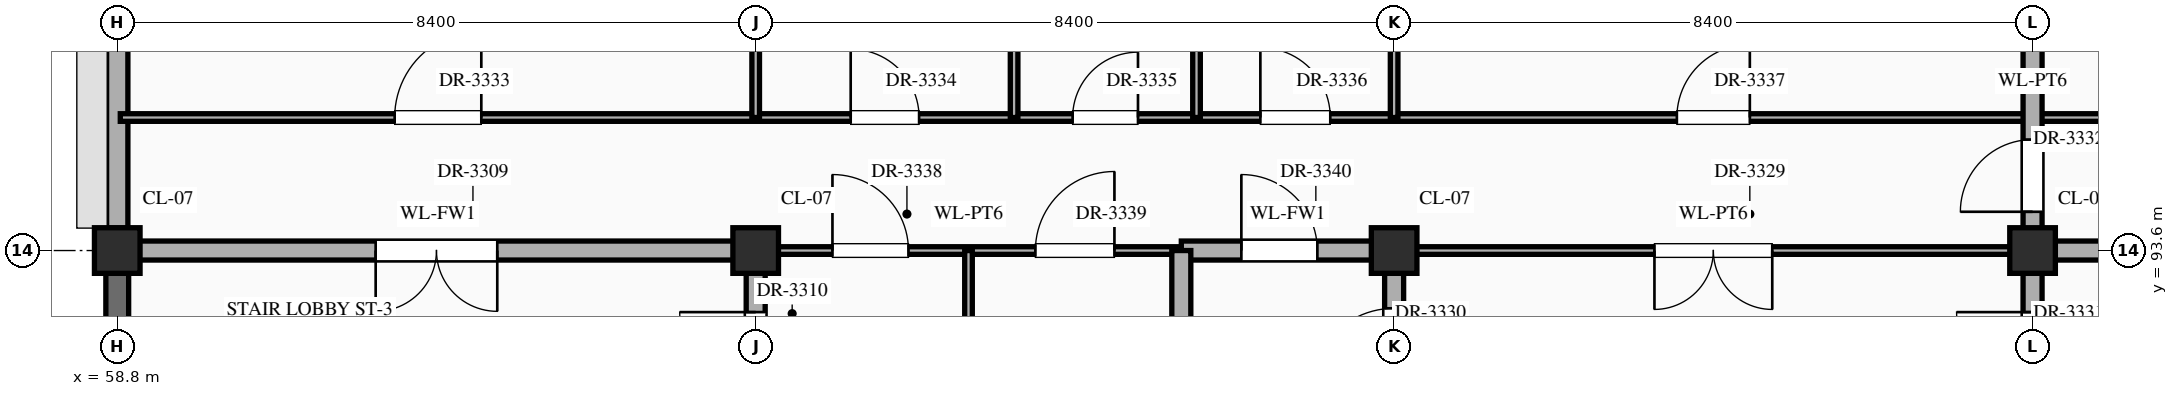
"""IFC4 building model, lengths in metres.
Left out: names, types, materials, properties, quantities, classifications, styles, units other than length and angle.
Written with IfcOpenShell. Run it as: python <this file> out.ifc"""

import sys

from ifc_helpers import new_model, si_unit, direction, frame, frame_2d, origin, origin_2d, place, context, subcontext, project, spatial, rectangle, extrude, element, fill, save


model = new_model("IFC4")
c1 = context("Model", 3, precision=1e-05, world=origin(), true_north=direction((0.0, 1.0)))
c2 = subcontext(c1, "Body", "Model", "MODEL_VIEW")
j1 = project(units=[si_unit("LENGTHUNIT", "METRE"), si_unit("PLANEANGLEUNIT", "RADIAN")], contexts=[c1])
p1 = place(None, origin())
s1 = spatial("IfcSite", under=j1, at=p1, CompositionType="ELEMENT")
p2 = place(p1, origin())
s2 = spatial("IfcBuilding", under=s1, at=p2, CompositionType="ELEMENT")
p3 = place(p2, frame((0.0, 0.0, 64.5)))
s3 = spatial("IfcBuildingStorey", under=s2, at=p3, CompositionType="ELEMENT", Elevation=64.5)
for number, where, z_axis, x_axis in (
    (1, (58.8, 93.6, 0.0), (0.0, 0.0, 1.0), (1.0, 0.0, 0.0)),
    (2, (67.2, 93.6, 0.0), (0.0, 0.0, 1.0), (1.0, 0.0, 0.0)),
    (3, (75.6, 93.6, 0.0), (0.0, 0.0, 1.0), (1.0, 0.0, 0.0)),
    (4, (84.0, 93.6, 0.0), (0.0, 0.0, 1.0), (1.0, 0.0, 0.0)),
):
    element("IfcColumn", number, at=place(p3, frame(where, z_axis=z_axis, x_axis=x_axis)), inside=s3, PredefinedType="COLUMN", context=c2, shape_type="SweptSolid", body=[
        extrude(rectangle(XDim=0.6, YDim=0.6, at=origin_2d()), origin(), (0.0, 0.0, 1.0), 4.2),
    ])
p4 = place(p3, frame((58.8, 86.695, 0.0), z_axis=(0.0, 0.0, 1.0), x_axis=(0.0, 1.0, 0.0)))
e5 = element("IfcWall", 5, at=p4, inside=s3, PredefinedType="SHEAR", context=c2, shape_type="SweptSolid", body=[
    extrude(rectangle(XDim=6.61, YDim=0.3, at=frame_2d((3.305, 0.0))), origin(), (0.0, 0.0, 1.0), 3.95),
])
p5 = place(p3, frame((58.8, 93.895, 0.0), z_axis=(0.0, 0.0, 1.0), x_axis=(0.0, 1.0, 0.0)))
e6 = element("IfcWall", 6, at=p5, inside=s3, PredefinedType="STANDARD", context=c2, shape_type="SweptSolid", body=[
    extrude(rectangle(XDim=6.61, YDim=0.28, at=frame_2d((3.305, 0.0))), origin(), (0.0, 0.0, 1.0), 3.3),
])
p6 = place(p5, frame((4.08, 0.0, 0.85)))
e7 = element("IfcOpeningElement", 7, at=p6, cuts=e6, PredefinedType="OPENING", context=c2, shape_type="SweptSolid", body=[
    extrude(rectangle(XDim=1.05, YDim=1.74, at=frame_2d((0.525, 0.87))), frame((0.0, 0.152, 0.0), z_axis=(0.0, -1.0, 0.0), x_axis=(1.0, 0.0, 0.0)), (0.0, 0.0, 1.0), 0.304),
])
p7 = place(p3, frame((58.84, 93.6, 0.0), z_axis=(0.0, 0.0, 1.0), x_axis=(1.0, 0.0, 0.0)))
e8 = element("IfcWall", 8, at=p7, inside=s3, PredefinedType="STANDARD", context=c2, shape_type="SweptSolid", body=[
    extrude(rectangle(XDim=8.36, YDim=0.25, at=frame_2d((4.18, 0.0))), origin(), (0.0, 0.0, 1.0), 3.1),
])
p8 = place(p7, frame((3.36, 0.0, 0.0)))
e9 = element("IfcOpeningElement", 9, at=p8, cuts=e8, PredefinedType="OPENING", context=c2, shape_type="SweptSolid", body=[
    extrude(rectangle(XDim=1.6, YDim=2.3, at=frame_2d((0.8, 1.15))), frame((0.0, 0.137, 0.0), z_axis=(0.0, -1.0, 0.0), x_axis=(1.0, 0.0, 0.0)), (0.0, 0.0, 1.0), 0.274),
])
p9 = place(p3, frame((67.2, 93.6, 0.0), z_axis=(0.0, 0.0, 1.0), x_axis=(1.0, 0.0, 0.0)))
e10 = element("IfcWall", 10, at=p9, inside=s3, PredefinedType="STANDARD", context=c2, shape_type="SweptSolid", body=[
    extrude(rectangle(XDim=5.6, YDim=0.1, at=frame_2d((2.8, 0.0))), origin(), (0.0, 0.0, 1.0), 3.1),
])
p10 = place(p9, frame((1.01, 0.0, 0.0)))
e11 = element("IfcOpeningElement", 11, at=p10, cuts=e10, PredefinedType="OPENING", context=c2, shape_type="SweptSolid", body=[
    extrude(rectangle(XDim=1.0, YDim=2.25, at=frame_2d((0.5, 1.125))), frame((0.0, 0.062, 0.0), z_axis=(0.0, -1.0, 0.0), x_axis=(1.0, 0.0, 0.0)), (0.0, 0.0, 1.0), 0.124),
])
p11 = place(p9, frame((3.68, 0.0, 0.0)))
e12 = element("IfcOpeningElement", 12, at=p11, cuts=e10, PredefinedType="OPENING", context=c2, shape_type="SweptSolid", body=[
    extrude(rectangle(XDim=1.04, YDim=2.2, at=frame_2d((0.52, 1.1))), frame((0.0, 0.062, 0.0), z_axis=(0.0, -1.0, 0.0), x_axis=(1.0, 0.0, 0.0)), (0.0, 0.0, 1.0), 0.124),
])
p12 = place(p3, frame((72.8, 93.6, 0.0), z_axis=(0.0, 0.0, 1.0), x_axis=(1.0, 0.0, 0.0)))
e13 = element("IfcWall", 13, at=p12, inside=s3, PredefinedType="STANDARD", context=c2, shape_type="SweptSolid", body=[
    extrude(rectangle(XDim=2.8, YDim=0.25, at=frame_2d((1.4, 0.0))), origin(), (0.0, 0.0, 1.0), 3.1),
])
p13 = place(p12, frame((0.79, 0.0, 0.0)))
e14 = element("IfcOpeningElement", 14, at=p13, cuts=e13, PredefinedType="OPENING", context=c2, shape_type="SweptSolid", body=[
    extrude(rectangle(XDim=1.0, YDim=2.2, at=frame_2d((0.5, 1.1))), frame((0.0, 0.137, 0.0), z_axis=(0.0, -1.0, 0.0), x_axis=(1.0, 0.0, 0.0)), (0.0, 0.0, 1.0), 0.274),
])
p14 = place(p3, frame((75.6, 93.6, 0.0), z_axis=(0.0, 0.0, 1.0), x_axis=(1.0, 0.0, 0.0)))
e15 = element("IfcWall", 15, at=p14, inside=s3, PredefinedType="STANDARD", context=c2, shape_type="SweptSolid", body=[
    extrude(rectangle(XDim=8.4, YDim=0.1, at=frame_2d((4.2, 0.0))), origin(), (0.0, 0.0, 1.0), 3.1),
])
p15 = place(p14, frame((3.425, 0.0, 0.0)))
e16 = element("IfcOpeningElement", 16, at=p15, cuts=e15, PredefinedType="OPENING", context=c2, shape_type="SweptSolid", body=[
    extrude(rectangle(XDim=1.55, YDim=2.35, at=frame_2d((0.775, 1.175))), frame((0.0, 0.062, 0.0), z_axis=(0.0, -1.0, 0.0), x_axis=(1.0, 0.0, 0.0)), (0.0, 0.0, 1.0), 0.124),
])
p16 = place(p3, frame((84.0, 93.6, 0.0), z_axis=(0.0, 0.0, 1.0), x_axis=(1.0, 0.0, 0.0)))
e17 = element("IfcWall", 17, at=p16, inside=s3, PredefinedType="STANDARD", context=c2, shape_type="SweptSolid", body=[
    extrude(rectangle(XDim=8.4, YDim=0.25, at=frame_2d((4.2, 0.0))), origin(), (0.0, 0.0, 1.0), 3.1),
])
p17 = place(p16, frame((3.7, 0.0, 0.0)))
e18 = element("IfcOpeningElement", 18, at=p17, cuts=e17, PredefinedType="OPENING", context=c2, shape_type="SweptSolid", body=[
    extrude(rectangle(XDim=1.0, YDim=2.2, at=frame_2d((0.5, 1.1))), frame((0.0, 0.137, 0.0), z_axis=(0.0, -1.0, 0.0), x_axis=(1.0, 0.0, 0.0)), (0.0, 0.0, 1.0), 0.274),
])
p18 = place(p3, frame((58.84, 95.35, 0.0), z_axis=(0.0, 0.0, 1.0), x_axis=(1.0, 0.0, 0.0)))
e19 = element("IfcWall", 19, at=p18, inside=s3, PredefinedType="STANDARD", context=c2, shape_type="SweptSolid", body=[
    extrude(rectangle(XDim=50.32, YDim=0.1, at=frame_2d((25.16, 0.0))), origin(), (0.0, 0.0, 1.0), 3.95),
])
p19 = place(p18, frame((3.61, 0.0, 0.0)))
e20 = element("IfcOpeningElement", 20, at=p19, cuts=e19, PredefinedType="OPENING", context=c2, shape_type="SweptSolid", body=[
    extrude(rectangle(XDim=1.14, YDim=2.4, at=frame_2d((0.57, 1.2))), frame((0.0, 0.062, 0.0), z_axis=(0.0, -1.0, 0.0), x_axis=(1.0, 0.0, 0.0)), (0.0, 0.0, 1.0), 0.124),
])
p20 = place(p18, frame((9.61, 0.0, 0.0)))
e21 = element("IfcOpeningElement", 21, at=p20, cuts=e19, PredefinedType="OPENING", context=c2, shape_type="SweptSolid", body=[
    extrude(rectangle(XDim=0.9, YDim=2.15, at=frame_2d((0.45, 1.075))), frame((0.0, 0.062, 0.0), z_axis=(0.0, -1.0, 0.0), x_axis=(1.0, 0.0, 0.0)), (0.0, 0.0, 1.0), 0.124),
])
p21 = place(p18, frame((12.53, 0.0, 0.0)))
e22 = element("IfcOpeningElement", 22, at=p21, cuts=e19, PredefinedType="OPENING", context=c2, shape_type="SweptSolid", body=[
    extrude(rectangle(XDim=0.86, YDim=2.1, at=frame_2d((0.43, 1.05))), frame((0.0, 0.062, 0.0), z_axis=(0.0, -1.0, 0.0), x_axis=(1.0, 0.0, 0.0)), (0.0, 0.0, 1.0), 0.124),
])
p22 = place(p18, frame((15.0, 0.0, 0.0)))
e23 = element("IfcOpeningElement", 23, at=p22, cuts=e19, PredefinedType="OPENING", context=c2, shape_type="SweptSolid", body=[
    extrude(rectangle(XDim=0.92, YDim=2.15, at=frame_2d((0.46, 1.075))), frame((0.0, 0.062, 0.0), z_axis=(0.0, -1.0, 0.0), x_axis=(1.0, 0.0, 0.0)), (0.0, 0.0, 1.0), 0.124),
])
p23 = place(p18, frame((20.48, 0.0, 0.0)))
e24 = element("IfcOpeningElement", 24, at=p23, cuts=e19, PredefinedType="OPENING", context=c2, shape_type="SweptSolid", body=[
    extrude(rectangle(XDim=0.96, YDim=2.2, at=frame_2d((0.48, 1.1))), frame((0.0, 0.062, 0.0), z_axis=(0.0, -1.0, 0.0), x_axis=(1.0, 0.0, 0.0)), (0.0, 0.0, 1.0), 0.124),
])
p24 = place(p18, frame((28.8, 0.0, 0.0)))
e25 = element("IfcOpeningElement", 25, at=p24, cuts=e19, PredefinedType="OPENING", context=c2, shape_type="SweptSolid", body=[
    extrude(rectangle(XDim=1.12, YDim=2.25, at=frame_2d((0.56, 1.125))), frame((0.0, 0.062, 0.0), z_axis=(0.0, -1.0, 0.0), x_axis=(1.0, 0.0, 0.0)), (0.0, 0.0, 1.0), 0.124),
])
p25 = place(p18, frame((34.68, 0.0, 0.0)))
e26 = element("IfcOpeningElement", 26, at=p25, cuts=e19, PredefinedType="OPENING", context=c2, shape_type="SweptSolid", body=[
    extrude(rectangle(XDim=1.16, YDim=2.3, at=frame_2d((0.58, 1.15))), frame((0.0, 0.062, 0.0), z_axis=(0.0, -1.0, 0.0), x_axis=(1.0, 0.0, 0.0)), (0.0, 0.0, 1.0), 0.124),
])
p26 = place(p18, frame((37.56, 0.0, 0.0)))
e27 = element("IfcOpeningElement", 27, at=p26, cuts=e19, PredefinedType="OPENING", context=c2, shape_type="SweptSolid", body=[
    extrude(rectangle(XDim=1.2, YDim=2.35, at=frame_2d((0.6, 1.175))), frame((0.0, 0.062, 0.0), z_axis=(0.0, -1.0, 0.0), x_axis=(1.0, 0.0, 0.0)), (0.0, 0.0, 1.0), 0.124),
])
p27 = place(p18, frame((40.04, 0.0, 0.0)))
e28 = element("IfcOpeningElement", 28, at=p27, cuts=e19, PredefinedType="OPENING", context=c2, shape_type="SweptSolid", body=[
    extrude(rectangle(XDim=1.24, YDim=2.3, at=frame_2d((0.62, 1.15))), frame((0.0, 0.062, 0.0), z_axis=(0.0, -1.0, 0.0), x_axis=(1.0, 0.0, 0.0)), (0.0, 0.0, 1.0), 0.124),
])
p28 = place(p18, frame((45.5, 0.0, 0.0)))
e29 = element("IfcOpeningElement", 29, at=p28, cuts=e19, PredefinedType="OPENING", context=c2, shape_type="SweptSolid", body=[
    extrude(rectangle(XDim=1.28, YDim=2.35, at=frame_2d((0.64, 1.175))), frame((0.0, 0.062, 0.0), z_axis=(0.0, -1.0, 0.0), x_axis=(1.0, 0.0, 0.0)), (0.0, 0.0, 1.0), 0.124),
])
p29 = place(p3, frame((67.2, 91.2, 0.0), z_axis=(0.0, 0.0, 1.0), x_axis=(0.0, 1.0, 0.0)))
e30 = element("IfcWall", 30, at=p29, inside=s3, PredefinedType="STANDARD", context=c2, shape_type="SweptSolid", body=[
    extrude(rectangle(XDim=2.4, YDim=0.25, at=frame_2d((1.2, 0.0))), origin(), (0.0, 0.0, 1.0), 3.2),
])
p30 = place(p29, frame((0.59, 0.0, 0.0)))
e31 = element("IfcOpeningElement", 31, at=p30, cuts=e30, PredefinedType="OPENING", context=c2, shape_type="SweptSolid", body=[
    extrude(rectangle(XDim=1.0, YDim=2.2, at=frame_2d((0.5, 1.1))), frame((0.0, 0.137, 0.0), z_axis=(0.0, -1.0, 0.0), x_axis=(1.0, 0.0, 0.0)), (0.0, 0.0, 1.0), 0.274),
])
p31 = place(p3, frame((67.2, 95.35, 0.0), z_axis=(0.0, 0.0, 1.0), x_axis=(0.0, 1.0, 0.0)))
e32 = element("IfcWall", 32, at=p31, inside=s3, PredefinedType="STANDARD", context=c2, shape_type="SweptSolid", body=[
    extrude(rectangle(XDim=5.45, YDim=0.1, at=frame_2d((2.725, 0.0))), origin(), (0.0, 0.0, 1.0), 3.2),
])
p32 = place(p3, frame((70.0, 86.4, 0.0), z_axis=(0.0, 0.0, 1.0), x_axis=(0.0, 1.0, 0.0)))
e33 = element("IfcWall", 33, at=p32, inside=s3, PredefinedType="STANDARD", context=c2, shape_type="SweptSolid", body=[
    extrude(rectangle(XDim=7.2, YDim=0.1, at=frame_2d((3.6, 0.0))), origin(), (0.0, 0.0, 1.0), 3.95),
])
p33 = place(p32, frame((3.12, 0.0, 0.0)))
e34 = element("IfcOpeningElement", 34, at=p33, cuts=e33, PredefinedType="OPENING", context=c2, shape_type="SweptSolid", body=[
    extrude(rectangle(XDim=0.96, YDim=2.2, at=frame_2d((0.48, 1.1))), frame((0.0, 0.062, 0.0), z_axis=(0.0, -1.0, 0.0), x_axis=(1.0, 0.0, 0.0)), (0.0, 0.0, 1.0), 0.124),
])
p34 = place(p3, frame((70.6, 95.35, 0.0), z_axis=(0.0, 0.0, 1.0), x_axis=(0.0, 1.0, 0.0)))
e35 = element("IfcWall", 35, at=p34, inside=s3, PredefinedType="STANDARD", context=c2, shape_type="SweptSolid", body=[
    extrude(rectangle(XDim=5.45, YDim=0.1, at=frame_2d((2.725, 0.0))), origin(), (0.0, 0.0, 1.0), 3.95),
])
p35 = place(p34, frame((2.155, 0.0, 0.0)))
e36 = element("IfcOpeningElement", 36, at=p35, cuts=e35, PredefinedType="OPENING", context=c2, shape_type="SweptSolid", body=[
    extrude(rectangle(XDim=1.14, YDim=2.4, at=frame_2d((0.57, 1.2))), frame((0.0, 0.062, 0.0), z_axis=(0.0, -1.0, 0.0), x_axis=(1.0, 0.0, 0.0)), (0.0, 0.0, 1.0), 0.124),
])
p36 = place(p3, frame((72.8, 86.4, 0.0), z_axis=(0.0, 0.0, 1.0), x_axis=(0.0, 1.0, 0.0)))
e37 = element("IfcWall", 37, at=p36, inside=s3, PredefinedType="STANDARD", context=c2, shape_type="SweptSolid", body=[
    extrude(rectangle(XDim=7.2, YDim=0.25, at=frame_2d((3.6, 0.0))), origin(), (0.0, 0.0, 1.0), 3.95),
])
p37 = place(p36, frame((3.125, 0.0, 0.0)))
e38 = element("IfcOpeningElement", 38, at=p37, cuts=e37, PredefinedType="OPENING", context=c2, shape_type="SweptSolid", body=[
    extrude(rectangle(XDim=0.95, YDim=2.15, at=frame_2d((0.475, 1.075))), frame((0.0, 0.137, 0.0), z_axis=(0.0, -1.0, 0.0), x_axis=(1.0, 0.0, 0.0)), (0.0, 0.0, 1.0), 0.274),
])
p38 = place(p3, frame((73.0, 95.35, 0.0), z_axis=(0.0, 0.0, 1.0), x_axis=(0.0, 1.0, 0.0)))
e39 = element("IfcWall", 39, at=p38, inside=s3, PredefinedType="STANDARD", context=c2, shape_type="SweptSolid", body=[
    extrude(rectangle(XDim=5.45, YDim=0.1, at=frame_2d((2.725, 0.0))), origin(), (0.0, 0.0, 1.0), 3.95),
])
p39 = place(p38, frame((2.275, 0.0, 0.0)))
e40 = element("IfcOpeningElement", 40, at=p39, cuts=e39, PredefinedType="OPENING", context=c2, shape_type="SweptSolid", body=[
    extrude(rectangle(XDim=0.9, YDim=2.15, at=frame_2d((0.45, 1.075))), frame((0.0, 0.062, 0.0), z_axis=(0.0, -1.0, 0.0), x_axis=(1.0, 0.0, 0.0)), (0.0, 0.0, 1.0), 0.124),
])
p40 = place(p3, frame((75.6, 86.4, 0.0), z_axis=(0.0, 0.0, 1.0), x_axis=(0.0, 1.0, 0.0)))
e41 = element("IfcWall", 41, at=p40, inside=s3, PredefinedType="STANDARD", context=c2, shape_type="SweptSolid", body=[
    extrude(rectangle(XDim=7.2, YDim=0.25, at=frame_2d((3.6, 0.0))), origin(), (0.0, 0.0, 1.0), 3.2),
])
p41 = place(p40, frame((5.34, 0.0, 0.0)))
e42 = element("IfcOpeningElement", 42, at=p41, cuts=e41, PredefinedType="OPENING", context=c2, shape_type="SweptSolid", body=[
    extrude(rectangle(XDim=1.1, YDim=2.2, at=frame_2d((0.55, 1.1))), frame((0.0, 0.137, 0.0), z_axis=(0.0, -1.0, 0.0), x_axis=(1.0, 0.0, 0.0)), (0.0, 0.0, 1.0), 0.274),
])
p42 = place(p3, frame((75.6, 95.35, 0.0), z_axis=(0.0, 0.0, 1.0), x_axis=(0.0, 1.0, 0.0)))
e43 = element("IfcWall", 43, at=p42, inside=s3, PredefinedType="STANDARD", context=c2, shape_type="SweptSolid", body=[
    extrude(rectangle(XDim=5.45, YDim=0.1, at=frame_2d((2.725, 0.0))), origin(), (0.0, 0.0, 1.0), 3.2),
])
p43 = place(p3, frame((84.0, 79.24, 0.0), z_axis=(0.0, 0.0, 1.0), x_axis=(0.0, 1.0, 0.0)))
e44 = element("IfcWall", 44, at=p43, inside=s3, PredefinedType="STANDARD", context=c2, shape_type="SweptSolid", body=[
    extrude(rectangle(XDim=25.16, YDim=0.25, at=frame_2d((12.58, 0.0))), origin(), (0.0, 0.0, 1.0), 3.1),
])
p44 = place(p43, frame((22.72, 0.0, 0.0)))
e45 = element("IfcOpeningElement", 45, at=p44, cuts=e44, PredefinedType="OPENING", context=c2, shape_type="SweptSolid", body=[
    extrude(rectangle(XDim=1.5, YDim=2.25, at=frame_2d((0.75, 1.125))), frame((0.0, 0.137, 0.0), z_axis=(0.0, -1.0, 0.0), x_axis=(1.0, 0.0, 0.0)), (0.0, 0.0, 1.0), 0.274),
])
p45 = place(p43, frame((12.55, 0.0, 0.0)))
e46 = element("IfcOpeningElement", 46, at=p45, cuts=e44, PredefinedType="OPENING", context=c2, shape_type="SweptSolid", body=[
    extrude(rectangle(XDim=1.0, YDim=2.2, at=frame_2d((0.5, 1.1))), frame((0.0, 0.137, 0.0), z_axis=(0.0, -1.0, 0.0), x_axis=(1.0, 0.0, 0.0)), (0.0, 0.0, 1.0), 0.274),
])
p46 = place(p43, frame((14.87, 0.0, 0.0)))
e47 = element("IfcOpeningElement", 47, at=p46, cuts=e44, PredefinedType="OPENING", context=c2, shape_type="SweptSolid", body=[
    extrude(rectangle(XDim=0.95, YDim=2.15, at=frame_2d((0.475, 1.075))), frame((0.0, 0.137, 0.0), z_axis=(0.0, -1.0, 0.0), x_axis=(1.0, 0.0, 0.0)), (0.0, 0.0, 1.0), 0.274),
])
p47 = place(p43, frame((5.7, 0.0, 0.0)))
e48 = element("IfcOpeningElement", 48, at=p47, cuts=e44, PredefinedType="OPENING", context=c2, shape_type="SweptSolid", body=[
    extrude(rectangle(XDim=0.95, YDim=2.15, at=frame_2d((0.475, 1.075))), frame((0.0, 0.137, 0.0), z_axis=(0.0, -1.0, 0.0), x_axis=(1.0, 0.0, 0.0)), (0.0, 0.0, 1.0), 0.274),
])
p48 = place(p8, frame((1.6, 0.0, 0.0), z_axis=(0.0, 0.0, 1.0), x_axis=(-1.0, 0.0, 0.0)))
e49 = element("IfcDoor", 49, at=p48, inside=s3, OperationType="DOUBLE_DOOR_SINGLE_SWING", PredefinedType="DOOR", context=c2, shape_type="SweptSolid", body=[
    extrude(rectangle(XDim=1.6, YDim=2.3, at=frame_2d((0.8, 1.15))), frame((0.0, 0.025, 0.0), z_axis=(0.0, -1.0, 0.0), x_axis=(1.0, 0.0, 0.0)), (0.0, 0.0, 1.0), 0.05),
])
fill(e9, e49)
p49 = place(p30, origin())
e50 = element("IfcDoor", 50, at=p49, inside=s3, OperationType="SINGLE_SWING_RIGHT", PredefinedType="DOOR", context=c2, shape_type="SweptSolid", body=[
    extrude(rectangle(XDim=1.0, YDim=2.2, at=frame_2d((0.5, 1.1))), frame((0.0, 0.025, 0.0), z_axis=(0.0, -1.0, 0.0), x_axis=(1.0, 0.0, 0.0)), (0.0, 0.0, 1.0), 0.05),
])
fill(e31, e50)
p50 = place(p15, frame((1.55, 0.0, 0.0), z_axis=(0.0, 0.0, 1.0), x_axis=(-1.0, 0.0, 0.0)))
e51 = element("IfcDoor", 51, at=p50, inside=s3, OperationType="DOUBLE_DOOR_SINGLE_SWING", PredefinedType="DOOR", context=c2, shape_type="SweptSolid", body=[
    extrude(rectangle(XDim=1.55, YDim=2.35, at=frame_2d((0.775, 1.175))), frame((0.0, 0.025, 0.0), z_axis=(0.0, -1.0, 0.0), x_axis=(1.0, 0.0, 0.0)), (0.0, 0.0, 1.0), 0.05),
])
fill(e16, e51)
p51 = place(p41, origin())
e52 = element("IfcDoor", 52, at=p51, inside=s3, OperationType="SINGLE_SWING_LEFT", PredefinedType="DOOR", context=c2, shape_type="SweptSolid", body=[
    extrude(rectangle(XDim=1.1, YDim=2.2, at=frame_2d((0.55, 1.1))), frame((0.0, 0.025, 0.0), z_axis=(0.0, -1.0, 0.0), x_axis=(1.0, 0.0, 0.0)), (0.0, 0.0, 1.0), 0.05),
])
fill(e42, e52)
p52 = place(p45, origin())
e53 = element("IfcDoor", 53, at=p52, inside=s3, OperationType="SINGLE_SWING_RIGHT", PredefinedType="DOOR", context=c2, shape_type="SweptSolid", body=[
    extrude(rectangle(XDim=1.0, YDim=2.2, at=frame_2d((0.5, 1.1))), frame((0.0, 0.025, 0.0), z_axis=(0.0, -1.0, 0.0), x_axis=(1.0, 0.0, 0.0)), (0.0, 0.0, 1.0), 0.05),
])
fill(e46, e53)
p53 = place(p46, origin())
e54 = element("IfcDoor", 54, at=p53, inside=s3, OperationType="SINGLE_SWING_LEFT", PredefinedType="DOOR", context=c2, shape_type="SweptSolid", body=[
    extrude(rectangle(XDim=0.95, YDim=2.15, at=frame_2d((0.475, 1.075))), frame((0.0, 0.025, 0.0), z_axis=(0.0, -1.0, 0.0), x_axis=(1.0, 0.0, 0.0)), (0.0, 0.0, 1.0), 0.05),
])
fill(e47, e54)
p54 = place(p19, origin())
e55 = element("IfcDoor", 55, at=p54, inside=s3, OperationType="SINGLE_SWING_RIGHT", PredefinedType="DOOR", context=c2, shape_type="SweptSolid", body=[
    extrude(rectangle(XDim=1.14, YDim=2.4, at=frame_2d((0.57, 1.2))), frame((0.0, 0.025, 0.0), z_axis=(0.0, -1.0, 0.0), x_axis=(1.0, 0.0, 0.0)), (0.0, 0.0, 1.0), 0.05),
])
fill(e20, e55)
p55 = place(p20, origin())
e56 = element("IfcDoor", 56, at=p55, inside=s3, OperationType="SINGLE_SWING_LEFT", PredefinedType="DOOR", context=c2, shape_type="SweptSolid", body=[
    extrude(rectangle(XDim=0.9, YDim=2.15, at=frame_2d((0.45, 1.075))), frame((0.0, 0.025, 0.0), z_axis=(0.0, -1.0, 0.0), x_axis=(1.0, 0.0, 0.0)), (0.0, 0.0, 1.0), 0.05),
])
fill(e21, e56)
p56 = place(p21, origin())
e57 = element("IfcDoor", 57, at=p56, inside=s3, OperationType="SINGLE_SWING_RIGHT", PredefinedType="DOOR", context=c2, shape_type="SweptSolid", body=[
    extrude(rectangle(XDim=0.86, YDim=2.1, at=frame_2d((0.43, 1.05))), frame((0.0, 0.025, 0.0), z_axis=(0.0, -1.0, 0.0), x_axis=(1.0, 0.0, 0.0)), (0.0, 0.0, 1.0), 0.05),
])
fill(e22, e57)
p57 = place(p22, origin())
e58 = element("IfcDoor", 58, at=p57, inside=s3, OperationType="SINGLE_SWING_LEFT", PredefinedType="DOOR", context=c2, shape_type="SweptSolid", body=[
    extrude(rectangle(XDim=0.92, YDim=2.15, at=frame_2d((0.46, 1.075))), frame((0.0, 0.025, 0.0), z_axis=(0.0, -1.0, 0.0), x_axis=(1.0, 0.0, 0.0)), (0.0, 0.0, 1.0), 0.05),
])
fill(e23, e58)
p58 = place(p23, origin())
e59 = element("IfcDoor", 59, at=p58, inside=s3, OperationType="SINGLE_SWING_RIGHT", PredefinedType="DOOR", context=c2, shape_type="SweptSolid", body=[
    extrude(rectangle(XDim=0.96, YDim=2.2, at=frame_2d((0.48, 1.1))), frame((0.0, 0.025, 0.0), z_axis=(0.0, -1.0, 0.0), x_axis=(1.0, 0.0, 0.0)), (0.0, 0.0, 1.0), 0.05),
])
fill(e24, e59)
p59 = place(p10, origin())
e60 = element("IfcDoor", 60, at=p59, inside=s3, OperationType="SINGLE_SWING_LEFT", PredefinedType="DOOR", context=c2, shape_type="SweptSolid", body=[
    extrude(rectangle(XDim=1.0, YDim=2.25, at=frame_2d((0.5, 1.125))), frame((0.0, 0.025, 0.0), z_axis=(0.0, -1.0, 0.0), x_axis=(1.0, 0.0, 0.0)), (0.0, 0.0, 1.0), 0.05),
])
fill(e11, e60)
p60 = place(p11, origin())
e61 = element("IfcDoor", 61, at=p60, inside=s3, OperationType="SINGLE_SWING_RIGHT", PredefinedType="DOOR", context=c2, shape_type="SweptSolid", body=[
    extrude(rectangle(XDim=1.04, YDim=2.2, at=frame_2d((0.52, 1.1))), frame((0.0, 0.025, 0.0), z_axis=(0.0, -1.0, 0.0), x_axis=(1.0, 0.0, 0.0)), (0.0, 0.0, 1.0), 0.05),
])
fill(e12, e61)
p61 = place(p13, origin())
e62 = element("IfcDoor", 62, at=p61, inside=s3, OperationType="SINGLE_SWING_LEFT", PredefinedType="DOOR", context=c2, shape_type="SweptSolid", body=[
    extrude(rectangle(XDim=1.0, YDim=2.2, at=frame_2d((0.5, 1.1))), frame((0.0, 0.025, 0.0), z_axis=(0.0, -1.0, 0.0), x_axis=(1.0, 0.0, 0.0)), (0.0, 0.0, 1.0), 0.05),
])
fill(e14, e62)
save(model, sys.argv[1])
